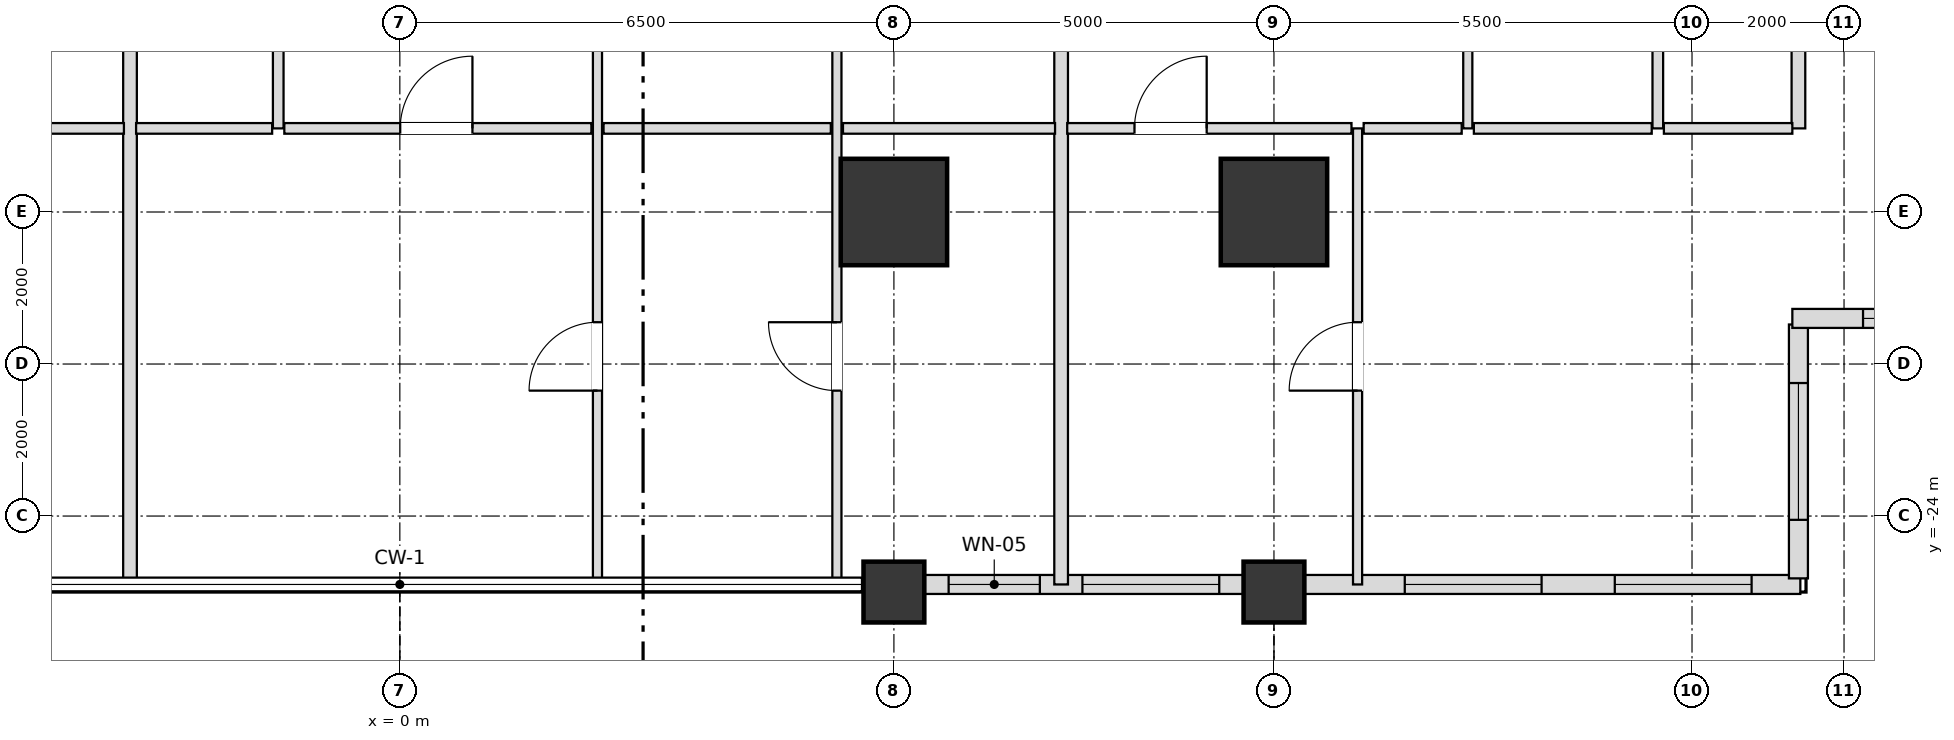
"""IFC4 building model, lengths in metres.
Left out: names, types, materials, properties, quantities, classifications, styles, units other than length and angle.
Written with IfcOpenShell. Run it as: python <this file> out.ifc"""

import sys

from ifc_helpers import new_model, si_unit, direction, frame, frame_2d, origin, origin_2d, place, context, subcontext, project, spatial, rectangle, extrude, element, fill, save


model = new_model("IFC4")
c1 = context("Model", 3, precision=1e-05, world=origin(), true_north=direction((0.0, 1.0)))
c2 = subcontext(c1, "Body", "Model", "MODEL_VIEW")
j1 = project(units=[si_unit("LENGTHUNIT", "METRE"), si_unit("PLANEANGLEUNIT", "RADIAN")], contexts=[c1])
p1 = place(None, origin())
s1 = spatial("IfcSite", under=j1, at=p1, CompositionType="ELEMENT")
p2 = place(p1, origin())
s2 = spatial("IfcBuilding", under=s1, at=p2, CompositionType="ELEMENT")
p3 = place(p2, frame((0.0, 0.0, 39.6)))
s3 = spatial("IfcBuildingStorey", under=s2, at=p3, CompositionType="ELEMENT", Elevation=39.6)
for number, where, z_axis, x_axis in (
    (1, (6.5, -20.0, 0.0), (0.0, 0.0, 1.0), (1.0, 0.0, 0.0)),
    (2, (11.5, -20.0, 0.0), (0.0, 0.0, 1.0), (1.0, 0.0, 0.0)),
):
    element("IfcColumn", number, at=place(p3, frame(where, z_axis=z_axis, x_axis=x_axis)), inside=s3, PredefinedType="USERDEFINED", context=c2, shape_type="SweptSolid", body=[
        extrude(rectangle(XDim=1.4, YDim=1.4, at=origin_2d()), origin(), (0.0, 0.0, 1.0), 3.6),
    ])
for number, where, z_axis, x_axis in (
    (3, (6.5, -25.0, 0.0), (0.0, 0.0, 1.0), (1.0, 0.0, 0.0)),
    (4, (11.5, -25.0, 0.0), (0.0, 0.0, 1.0), (1.0, 0.0, 0.0)),
):
    element("IfcColumn", number, at=place(p3, frame(where, z_axis=z_axis, x_axis=x_axis)), inside=s3, PredefinedType="COLUMN", context=c2, shape_type="SweptSolid", body=[
        extrude(rectangle(XDim=0.8, YDim=0.8, at=origin_2d()), origin(), (0.0, 0.0, 1.0), 3.6),
    ])
p4 = place(p3, frame((6.895, -24.9, 0.0), z_axis=(0.0, 0.0, 1.0), x_axis=(1.0, 0.0, 0.0)))
e5 = element("IfcWall", 5, at=p4, inside=s3, PredefinedType="SOLIDWALL", context=c2, shape_type="SweptSolid", body=[
    extrude(rectangle(XDim=4.21, YDim=0.25, at=frame_2d((2.105, 0.0))), origin(), (0.0, 0.0, 1.0), 2.736),
])
p5 = place(p4, frame((0.325, 0.0, 0.72)))
e6 = element("IfcOpeningElement", 6, at=p5, cuts=e5, PredefinedType="OPENING", context=c2, shape_type="SweptSolid", body=[
    extrude(rectangle(XDim=1.2, YDim=1.68, at=frame_2d((0.6, 0.84))), frame((0.0, 0.135, 0.0), z_axis=(0.0, -1.0, 0.0), x_axis=(1.0, 0.0, 0.0)), (0.0, 0.0, 1.0), 0.27),
])
p6 = place(p4, frame((2.085, 0.0, 0.72)))
e7 = element("IfcOpeningElement", 7, at=p6, cuts=e5, PredefinedType="OPENING", context=c2, shape_type="SweptSolid", body=[
    extrude(rectangle(XDim=1.8, YDim=1.68, at=frame_2d((0.9, 0.84))), frame((0.0, 0.135, 0.0), z_axis=(0.0, -1.0, 0.0), x_axis=(1.0, 0.0, 0.0)), (0.0, 0.0, 1.0), 0.27),
])
p7 = place(p3, frame((11.895, -24.9, 0.0), z_axis=(0.0, 0.0, 1.0), x_axis=(1.0, 0.0, 0.0)))
e8 = element("IfcWall", 8, at=p7, inside=s3, PredefinedType="SOLIDWALL", context=c2, shape_type="SweptSolid", body=[
    extrude(rectangle(XDim=6.53, YDim=0.25, at=frame_2d((3.265, 0.0))), origin(), (0.0, 0.0, 1.0), 2.736),
])
p8 = place(p7, frame((1.326, 0.0, 0.72)))
e9 = element("IfcOpeningElement", 9, at=p8, cuts=e8, PredefinedType="OPENING", context=c2, shape_type="SweptSolid", body=[
    extrude(rectangle(XDim=1.8, YDim=1.68, at=frame_2d((0.9, 0.84))), frame((0.0, 0.135, 0.0), z_axis=(0.0, -1.0, 0.0), x_axis=(1.0, 0.0, 0.0)), (0.0, 0.0, 1.0), 0.27),
])
p9 = place(p7, frame((4.089, 0.0, 0.72)))
e10 = element("IfcOpeningElement", 10, at=p9, cuts=e8, PredefinedType="OPENING", context=c2, shape_type="SweptSolid", body=[
    extrude(rectangle(XDim=1.8, YDim=1.68, at=frame_2d((0.9, 0.84))), frame((0.0, 0.135, 0.0), z_axis=(0.0, -1.0, 0.0), x_axis=(1.0, 0.0, 0.0)), (0.0, 0.0, 1.0), 0.27),
])
p10 = place(p3, frame((18.4, -24.82, 0.0), z_axis=(0.0, 0.0, 1.0), x_axis=(0.0, 1.0, 0.0)))
e11 = element("IfcWall", 11, at=p10, inside=s3, PredefinedType="SOLIDWALL", context=c2, shape_type="SweptSolid", body=[
    extrude(rectangle(XDim=3.34, YDim=0.25, at=frame_2d((1.67, 0.0))), origin(), (0.0, 0.0, 1.0), 2.736),
])
p11 = place(p10, frame((0.77, 0.0, 0.72)))
e12 = element("IfcOpeningElement", 12, at=p11, cuts=e11, PredefinedType="OPENING", context=c2, shape_type="SweptSolid", body=[
    extrude(rectangle(XDim=1.8, YDim=1.68, at=frame_2d((0.9, 0.84))), frame((0.0, 0.135, 0.0), z_axis=(0.0, -1.0, 0.0), x_axis=(1.0, 0.0, 0.0)), (0.0, 0.0, 1.0), 0.27),
])
p12 = place(p3, frame((18.32, -21.4, 0.0), z_axis=(0.0, 0.0, 1.0), x_axis=(1.0, 0.0, 0.0)))
e13 = element("IfcWall", 13, at=p12, inside=s3, PredefinedType="SOLIDWALL", context=c2, shape_type="SweptSolid", body=[
    extrude(rectangle(XDim=3.66, YDim=0.25, at=frame_2d((1.83, 0.0))), origin(), (0.0, 0.0, 1.0), 2.736),
])
p13 = place(p12, frame((0.93, 0.0, 0.72)))
e14 = element("IfcOpeningElement", 14, at=p13, cuts=e13, PredefinedType="OPENING", context=c2, shape_type="SweptSolid", body=[
    extrude(rectangle(XDim=1.8, YDim=1.68, at=frame_2d((0.9, 0.84))), frame((0.0, 0.135, 0.0), z_axis=(0.0, -1.0, 0.0), x_axis=(1.0, 0.0, 0.0)), (0.0, 0.0, 1.0), 0.27),
])
p14 = place(p3, frame((-3.55, -24.9, 0.0), z_axis=(0.0, 0.0, 1.0), x_axis=(0.0, 1.0, 0.0)))
e15 = element("IfcWall", 15, at=p14, inside=s3, PredefinedType="PARTITIONING", context=c2, shape_type="SweptSolid", body=[
    extrude(rectangle(XDim=15.6, YDim=0.18, at=frame_2d((7.8, 0.0))), origin(), (0.0, 0.0, 1.0), 2.816),
])
p15 = place(p3, frame((-1.6, -18.9, 0.0), z_axis=(0.0, 0.0, 1.0), x_axis=(0.0, 1.0, 0.0)))
e16 = element("IfcWall", 16, at=p15, inside=s3, PredefinedType="PARTITIONING", context=c2, shape_type="SweptSolid", body=[
    extrude(rectangle(XDim=9.6, YDim=0.14, at=frame_2d((4.8, 0.0))), origin(), (0.0, 0.0, 1.0), 2.948),
])
p16 = place(p15, frame((4.35, 0.0, 0.0)))
e17 = element("IfcOpeningElement", 17, at=p16, cuts=e16, PredefinedType="OPENING", context=c2, shape_type="SweptSolid", body=[
    extrude(rectangle(XDim=0.9, YDim=2.1, at=frame_2d((0.45, 1.05))), frame((0.0, 0.08, 0.0), z_axis=(0.0, -1.0, 0.0), x_axis=(1.0, 0.0, 0.0)), (0.0, 0.0, 1.0), 0.16),
])
p17 = place(p3, frame((2.6, -24.9, 0.0), z_axis=(0.0, 0.0, 1.0), x_axis=(0.0, 1.0, 0.0)))
e18 = element("IfcWall", 18, at=p17, inside=s3, PredefinedType="PARTITIONING", context=c2, shape_type="SweptSolid", body=[
    extrude(rectangle(XDim=15.6, YDim=0.12, at=frame_2d((7.8, 0.0))), origin(), (0.0, 0.0, 1.0), 2.816),
])
p18 = place(p17, frame((10.325, 0.0, 0.0)))
e19 = element("IfcOpeningElement", 19, at=p18, cuts=e18, PredefinedType="OPENING", context=c2, shape_type="SweptSolid", body=[
    extrude(rectangle(XDim=0.95, YDim=2.1, at=frame_2d((0.475, 1.05))), frame((0.0, 0.07, 0.0), z_axis=(0.0, -1.0, 0.0), x_axis=(1.0, 0.0, 0.0)), (0.0, 0.0, 1.0), 0.14),
])
p19 = place(p17, frame((2.55, 0.0, 0.0)))
e20 = element("IfcOpeningElement", 20, at=p19, cuts=e18, PredefinedType="OPENING", context=c2, shape_type="SweptSolid", body=[
    extrude(rectangle(XDim=0.9, YDim=2.1, at=frame_2d((0.45, 1.05))), frame((0.0, 0.07, 0.0), z_axis=(0.0, -1.0, 0.0), x_axis=(1.0, 0.0, 0.0)), (0.0, 0.0, 1.0), 0.14),
])
p20 = place(p3, frame((5.75, -24.9, 0.0), z_axis=(0.0, 0.0, 1.0), x_axis=(0.0, 1.0, 0.0)))
e21 = element("IfcWall", 21, at=p20, inside=s3, PredefinedType="PARTITIONING", context=c2, shape_type="SweptSolid", body=[
    extrude(rectangle(XDim=15.6, YDim=0.12, at=frame_2d((7.8, 0.0))), origin(), (0.0, 0.0, 1.0), 2.816),
])
p21 = place(p20, frame((10.35, 0.0, 0.0)))
e22 = element("IfcOpeningElement", 22, at=p21, cuts=e21, PredefinedType="OPENING", context=c2, shape_type="SweptSolid", body=[
    extrude(rectangle(XDim=0.9, YDim=2.1, at=frame_2d((0.45, 1.05))), frame((0.0, 0.07, 0.0), z_axis=(0.0, -1.0, 0.0), x_axis=(1.0, 0.0, 0.0)), (0.0, 0.0, 1.0), 0.14),
])
p22 = place(p20, frame((2.55, 0.0, 0.0)))
e23 = element("IfcOpeningElement", 23, at=p22, cuts=e21, PredefinedType="OPENING", context=c2, shape_type="SweptSolid", body=[
    extrude(rectangle(XDim=0.9, YDim=2.1, at=frame_2d((0.45, 1.05))), frame((0.0, 0.07, 0.0), z_axis=(0.0, -1.0, 0.0), x_axis=(1.0, 0.0, 0.0)), (0.0, 0.0, 1.0), 0.14),
])
p23 = place(p3, frame((8.7, -24.9, 0.0), z_axis=(0.0, 0.0, 1.0), x_axis=(0.0, 1.0, 0.0)))
e24 = element("IfcWall", 24, at=p23, inside=s3, PredefinedType="PARTITIONING", context=c2, shape_type="SweptSolid", body=[
    extrude(rectangle(XDim=15.6, YDim=0.18, at=frame_2d((7.8, 0.0))), origin(), (0.0, 0.0, 1.0), 2.816),
])
p24 = place(p3, frame((12.6, -24.9, 0.0), z_axis=(0.0, 0.0, 1.0), x_axis=(0.0, 1.0, 0.0)))
e25 = element("IfcWall", 25, at=p24, inside=s3, PredefinedType="PARTITIONING", context=c2, shape_type="SweptSolid", body=[
    extrude(rectangle(XDim=6.0, YDim=0.12, at=frame_2d((3.0, 0.0))), origin(), (0.0, 0.0, 1.0), 2.736),
])
p25 = place(p24, frame((2.55, 0.0, 0.0)))
e26 = element("IfcOpeningElement", 26, at=p25, cuts=e25, PredefinedType="OPENING", context=c2, shape_type="SweptSolid", body=[
    extrude(rectangle(XDim=0.9, YDim=2.1, at=frame_2d((0.45, 1.05))), frame((0.0, 0.07, 0.0), z_axis=(0.0, -1.0, 0.0), x_axis=(1.0, 0.0, 0.0)), (0.0, 0.0, 1.0), 0.14),
])
p26 = place(p3, frame((14.05, -18.9, 0.0), z_axis=(0.0, 0.0, 1.0), x_axis=(0.0, 1.0, 0.0)))
e27 = element("IfcWall", 27, at=p26, inside=s3, PredefinedType="PARTITIONING", context=c2, shape_type="SweptSolid", body=[
    extrude(rectangle(XDim=9.6, YDim=0.12, at=frame_2d((4.8, 0.0))), origin(), (0.0, 0.0, 1.0), 2.736),
])
p27 = place(p26, frame((4.325, 0.0, 0.0)))
e28 = element("IfcOpeningElement", 28, at=p27, cuts=e27, PredefinedType="OPENING", context=c2, shape_type="SweptSolid", body=[
    extrude(rectangle(XDim=0.95, YDim=2.1, at=frame_2d((0.475, 1.05))), frame((0.0, 0.07, 0.0), z_axis=(0.0, -1.0, 0.0), x_axis=(1.0, 0.0, 0.0)), (0.0, 0.0, 1.0), 0.14),
])
p28 = place(p3, frame((16.55, -18.9, 0.0), z_axis=(0.0, 0.0, 1.0), x_axis=(0.0, 1.0, 0.0)))
e29 = element("IfcWall", 29, at=p28, inside=s3, PredefinedType="PARTITIONING", context=c2, shape_type="SweptSolid", body=[
    extrude(rectangle(XDim=9.6, YDim=0.14, at=frame_2d((4.8, 0.0))), origin(), (0.0, 0.0, 1.0), 2.736),
])
p29 = place(p28, frame((4.222, 0.0, 0.0)))
e30 = element("IfcOpeningElement", 30, at=p29, cuts=e29, PredefinedType="OPENING", context=c2, shape_type="SweptSolid", body=[
    extrude(rectangle(XDim=0.9, YDim=2.1, at=frame_2d((0.45, 1.05))), frame((0.0, 0.08, 0.0), z_axis=(0.0, -1.0, 0.0), x_axis=(1.0, 0.0, 0.0)), (0.0, 0.0, 1.0), 0.16),
])
p30 = place(p3, frame((18.4, -18.9, 0.0), z_axis=(0.0, 0.0, 1.0), x_axis=(0.0, 1.0, 0.0)))
e31 = element("IfcWall", 31, at=p30, inside=s3, PredefinedType="PARTITIONING", context=c2, shape_type="SweptSolid", body=[
    extrude(rectangle(XDim=9.6, YDim=0.18, at=frame_2d((4.8, 0.0))), origin(), (0.0, 0.0, 1.0), 2.736),
])
p31 = place(p3, frame((-7.67, -18.9, 0.0), z_axis=(0.0, 0.0, 1.0), x_axis=(1.0, 0.0, 0.0)))
e32 = element("IfcWall", 32, at=p31, inside=s3, PredefinedType="PARTITIONING", context=c2, shape_type="SweptSolid", body=[
    extrude(rectangle(XDim=4.04, YDim=0.14, at=frame_2d((2.02, 0.0))), origin(), (0.0, 0.0, 1.0), 2.816),
])
p32 = place(p31, frame((1.934, 0.0, 0.0)))
e33 = element("IfcOpeningElement", 33, at=p32, cuts=e32, PredefinedType="OPENING", context=c2, shape_type="SweptSolid", body=[
    extrude(rectangle(XDim=0.95, YDim=2.1, at=frame_2d((0.475, 1.05))), frame((0.0, 0.08, 0.0), z_axis=(0.0, -1.0, 0.0), x_axis=(1.0, 0.0, 0.0)), (0.0, 0.0, 1.0), 0.16),
])
p33 = place(p3, frame((-3.47, -18.9, 0.0), z_axis=(0.0, 0.0, 1.0), x_axis=(1.0, 0.0, 0.0)))
e34 = element("IfcWall", 34, at=p33, inside=s3, PredefinedType="PARTITIONING", context=c2, shape_type="SweptSolid", body=[
    extrude(rectangle(XDim=1.79, YDim=0.14, at=frame_2d((0.895, 0.0))), origin(), (0.0, 0.0, 1.0), 3.38),
])
p34 = place(p3, frame((-1.52, -18.9, 0.0), z_axis=(0.0, 0.0, 1.0), x_axis=(1.0, 0.0, 0.0)))
e35 = element("IfcWall", 35, at=p34, inside=s3, PredefinedType="PARTITIONING", context=c2, shape_type="SweptSolid", body=[
    extrude(rectangle(XDim=4.04, YDim=0.14, at=frame_2d((2.02, 0.0))), origin(), (0.0, 0.0, 1.0), 3.38),
])
p35 = place(p34, frame((1.525, 0.0, 0.0)))
e36 = element("IfcOpeningElement", 36, at=p35, cuts=e35, PredefinedType="OPENING", context=c2, shape_type="SweptSolid", body=[
    extrude(rectangle(XDim=0.95, YDim=2.1, at=frame_2d((0.475, 1.05))), frame((0.0, 0.08, 0.0), z_axis=(0.0, -1.0, 0.0), x_axis=(1.0, 0.0, 0.0)), (0.0, 0.0, 1.0), 0.16),
])
p36 = place(p3, frame((2.68, -18.9, 0.0), z_axis=(0.0, 0.0, 1.0), x_axis=(1.0, 0.0, 0.0)))
e37 = element("IfcWall", 37, at=p36, inside=s3, PredefinedType="PARTITIONING", context=c2, shape_type="SweptSolid", body=[
    extrude(rectangle(XDim=2.99, YDim=0.14, at=frame_2d((1.495, 0.0))), origin(), (0.0, 0.0, 1.0), 3.38),
])
p37 = place(p3, frame((5.83, -18.9, 0.0), z_axis=(0.0, 0.0, 1.0), x_axis=(1.0, 0.0, 0.0)))
e38 = element("IfcWall", 38, at=p37, inside=s3, PredefinedType="PARTITIONING", context=c2, shape_type="SweptSolid", body=[
    extrude(rectangle(XDim=2.79, YDim=0.14, at=frame_2d((1.395, 0.0))), origin(), (0.0, 0.0, 1.0), 2.816),
])
p38 = place(p3, frame((8.78, -18.9, 0.0), z_axis=(0.0, 0.0, 1.0), x_axis=(1.0, 0.0, 0.0)))
e39 = element("IfcWall", 39, at=p38, inside=s3, PredefinedType="PARTITIONING", context=c2, shape_type="SweptSolid", body=[
    extrude(rectangle(XDim=3.74, YDim=0.14, at=frame_2d((1.87, 0.0))), origin(), (0.0, 0.0, 1.0), 2.736),
])
p39 = place(p38, frame((0.885, 0.0, 0.0)))
e40 = element("IfcOpeningElement", 40, at=p39, cuts=e39, PredefinedType="OPENING", context=c2, shape_type="SweptSolid", body=[
    extrude(rectangle(XDim=0.95, YDim=2.1, at=frame_2d((0.475, 1.05))), frame((0.0, 0.08, 0.0), z_axis=(0.0, -1.0, 0.0), x_axis=(1.0, 0.0, 0.0)), (0.0, 0.0, 1.0), 0.16),
])
p40 = place(p3, frame((12.68, -18.9, 0.0), z_axis=(0.0, 0.0, 1.0), x_axis=(1.0, 0.0, 0.0)))
e41 = element("IfcWall", 41, at=p40, inside=s3, PredefinedType="PARTITIONING", context=c2, shape_type="SweptSolid", body=[
    extrude(rectangle(XDim=1.29, YDim=0.14, at=frame_2d((0.645, 0.0))), origin(), (0.0, 0.0, 1.0), 2.736),
])
p41 = place(p3, frame((14.13, -18.9, 0.0), z_axis=(0.0, 0.0, 1.0), x_axis=(1.0, 0.0, 0.0)))
e42 = element("IfcWall", 42, at=p41, inside=s3, PredefinedType="PARTITIONING", context=c2, shape_type="SweptSolid", body=[
    extrude(rectangle(XDim=2.34, YDim=0.14, at=frame_2d((1.17, 0.0))), origin(), (0.0, 0.0, 1.0), 2.736),
])
p42 = place(p3, frame((16.63, -18.9, 0.0), z_axis=(0.0, 0.0, 1.0), x_axis=(1.0, 0.0, 0.0)))
e43 = element("IfcWall", 43, at=p42, inside=s3, PredefinedType="PARTITIONING", context=c2, shape_type="SweptSolid", body=[
    extrude(rectangle(XDim=1.69, YDim=0.14, at=frame_2d((0.845, 0.0))), origin(), (0.0, 0.0, 1.0), 2.736),
])
p43 = place(p5, origin())
e44 = element("IfcWindow", 44, at=p43, inside=s3, PartitioningType="SINGLE_PANEL", PredefinedType="WINDOW", context=c2, shape_type="SweptSolid", body=[
    extrude(rectangle(XDim=1.2, YDim=1.68, at=frame_2d((0.6, 0.84))), frame((0.0, 0.03, 0.0), z_axis=(0.0, -1.0, 0.0), x_axis=(1.0, 0.0, 0.0)), (0.0, 0.0, 1.0), 0.06),
])
fill(e6, e44)
p44 = place(p6, origin())
e45 = element("IfcWindow", 45, at=p44, inside=s3, PartitioningType="SINGLE_PANEL", PredefinedType="WINDOW", context=c2, shape_type="SweptSolid", body=[
    extrude(rectangle(XDim=1.8, YDim=1.68, at=frame_2d((0.9, 0.84))), frame((0.0, 0.03, 0.0), z_axis=(0.0, -1.0, 0.0), x_axis=(1.0, 0.0, 0.0)), (0.0, 0.0, 1.0), 0.06),
])
fill(e7, e45)
p45 = place(p8, origin())
e46 = element("IfcWindow", 46, at=p45, inside=s3, PartitioningType="SINGLE_PANEL", PredefinedType="WINDOW", context=c2, shape_type="SweptSolid", body=[
    extrude(rectangle(XDim=1.8, YDim=1.68, at=frame_2d((0.9, 0.84))), frame((0.0, 0.03, 0.0), z_axis=(0.0, -1.0, 0.0), x_axis=(1.0, 0.0, 0.0)), (0.0, 0.0, 1.0), 0.06),
])
fill(e9, e46)
p46 = place(p9, origin())
e47 = element("IfcWindow", 47, at=p46, inside=s3, PartitioningType="SINGLE_PANEL", PredefinedType="WINDOW", context=c2, shape_type="SweptSolid", body=[
    extrude(rectangle(XDim=1.8, YDim=1.68, at=frame_2d((0.9, 0.84))), frame((0.0, 0.03, 0.0), z_axis=(0.0, -1.0, 0.0), x_axis=(1.0, 0.0, 0.0)), (0.0, 0.0, 1.0), 0.06),
])
fill(e10, e47)
p47 = place(p11, origin())
e48 = element("IfcWindow", 48, at=p47, inside=s3, PartitioningType="SINGLE_PANEL", PredefinedType="WINDOW", context=c2, shape_type="SweptSolid", body=[
    extrude(rectangle(XDim=1.8, YDim=1.68, at=frame_2d((0.9, 0.84))), frame((0.0, 0.03, 0.0), z_axis=(0.0, -1.0, 0.0), x_axis=(1.0, 0.0, 0.0)), (0.0, 0.0, 1.0), 0.06),
])
fill(e12, e48)
p48 = place(p13, origin())
e49 = element("IfcWindow", 49, at=p48, inside=s3, PartitioningType="SINGLE_PANEL", PredefinedType="WINDOW", context=c2, shape_type="SweptSolid", body=[
    extrude(rectangle(XDim=1.8, YDim=1.68, at=frame_2d((0.9, 0.84))), frame((0.0, 0.03, 0.0), z_axis=(0.0, -1.0, 0.0), x_axis=(1.0, 0.0, 0.0)), (0.0, 0.0, 1.0), 0.06),
])
fill(e14, e49)
p49 = place(p35, origin())
e50 = element("IfcDoor", 50, at=p49, inside=s3, OperationType="SINGLE_SWING_RIGHT", PredefinedType="DOOR", context=c2, shape_type="SweptSolid", body=[
    extrude(rectangle(XDim=0.95, YDim=2.1, at=frame_2d((0.475, 1.05))), frame((0.0, 0.025, 0.0), z_axis=(0.0, -1.0, 0.0), x_axis=(1.0, 0.0, 0.0)), (0.0, 0.0, 1.0), 0.05),
])
fill(e36, e50)
p50 = place(p19, origin())
e51 = element("IfcDoor", 51, at=p50, inside=s3, OperationType="SINGLE_SWING_LEFT", PredefinedType="DOOR", context=c2, shape_type="SweptSolid", body=[
    extrude(rectangle(XDim=0.9, YDim=2.1, at=frame_2d((0.45, 1.05))), frame((0.0, 0.025, 0.0), z_axis=(0.0, -1.0, 0.0), x_axis=(1.0, 0.0, 0.0)), (0.0, 0.0, 1.0), 0.05),
])
fill(e20, e51)
p51 = place(p22, origin())
e52 = element("IfcDoor", 52, at=p51, inside=s3, OperationType="SINGLE_SWING_RIGHT", PredefinedType="DOOR", context=c2, shape_type="SweptSolid", body=[
    extrude(rectangle(XDim=0.9, YDim=2.1, at=frame_2d((0.45, 1.05))), frame((0.0, 0.025, 0.0), z_axis=(0.0, -1.0, 0.0), x_axis=(1.0, 0.0, 0.0)), (0.0, 0.0, 1.0), 0.05),
])
fill(e23, e52)
p52 = place(p39, origin())
e53 = element("IfcDoor", 53, at=p52, inside=s3, OperationType="SINGLE_SWING_RIGHT", PredefinedType="DOOR", context=c2, shape_type="SweptSolid", body=[
    extrude(rectangle(XDim=0.95, YDim=2.1, at=frame_2d((0.475, 1.05))), frame((0.0, 0.025, 0.0), z_axis=(0.0, -1.0, 0.0), x_axis=(1.0, 0.0, 0.0)), (0.0, 0.0, 1.0), 0.05),
])
fill(e40, e53)
p53 = place(p25, origin())
e54 = element("IfcDoor", 54, at=p53, inside=s3, OperationType="SINGLE_SWING_LEFT", PredefinedType="DOOR", context=c2, shape_type="SweptSolid", body=[
    extrude(rectangle(XDim=0.9, YDim=2.1, at=frame_2d((0.45, 1.05))), frame((0.0, 0.025, 0.0), z_axis=(0.0, -1.0, 0.0), x_axis=(1.0, 0.0, 0.0)), (0.0, 0.0, 1.0), 0.05),
])
fill(e26, e54)
save(model, sys.argv[1])
